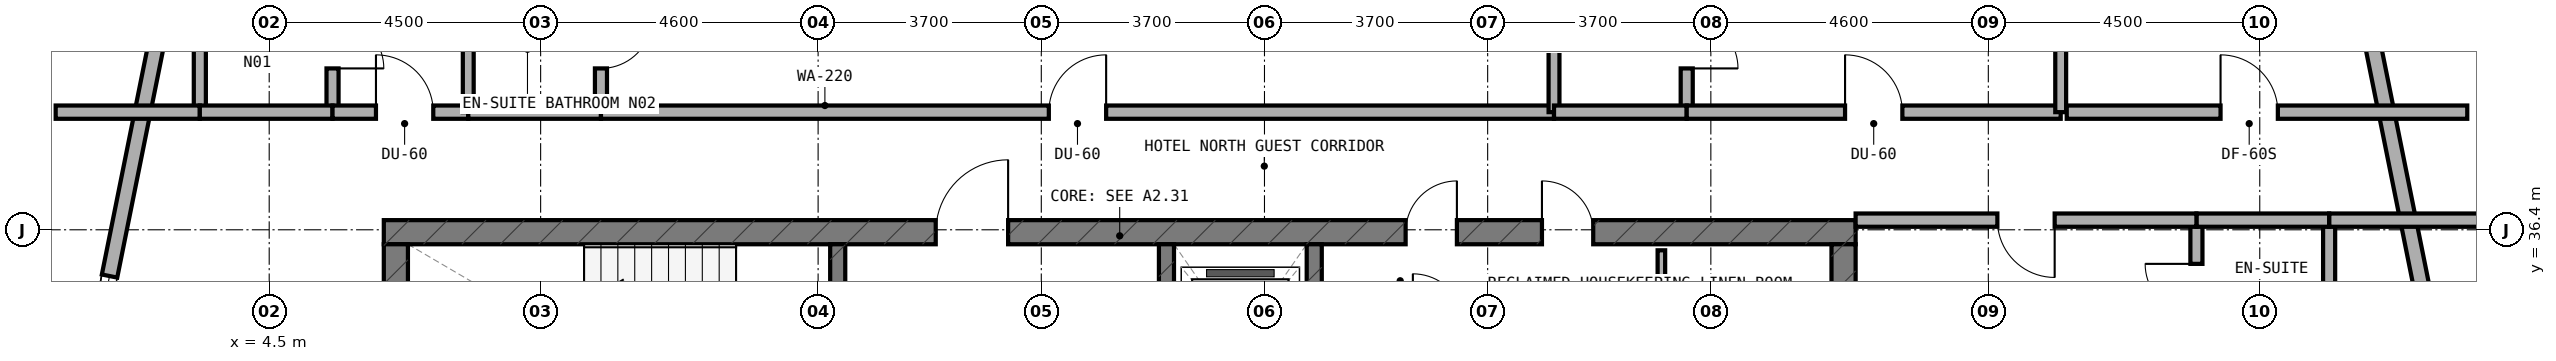
"""IFC4 building model, lengths in metres.
Left out: names, types, materials, properties, quantities, classifications, styles, units other than length and angle.
Written with IfcOpenShell. Run it as: python <this file> out.ifc"""

import sys

from ifc_helpers import new_model, si_unit, direction, frame, frame_2d, origin, place, context, subcontext, project, spatial, rectangle, extrude, element, fill, save


model = new_model("IFC4")
c1 = context("Model", 3, precision=1e-05, world=origin(), true_north=direction((0.0, 1.0)))
c2 = subcontext(c1, "Body", "Model", "MODEL_VIEW")
j1 = project(units=[si_unit("LENGTHUNIT", "METRE"), si_unit("PLANEANGLEUNIT", "RADIAN")], contexts=[c1])
p1 = place(None, origin())
s1 = spatial("IfcSite", under=j1, at=p1, CompositionType="ELEMENT")
p2 = place(p1, origin())
s2 = spatial("IfcBuilding", under=s1, at=p2, CompositionType="ELEMENT")
p3 = place(p2, frame((0.0, 0.0, 134.5)))
s3 = spatial("IfcBuildingStorey", under=s2, at=p3, CompositionType="ELEMENT", Elevation=134.5)
p4 = place(p3, frame((6.4, 36.36, 0.0), z_axis=(0.0, 0.0, 1.0), x_axis=(1.0, 0.0, 0.0)))
e1 = element("IfcWall", 1, at=p4, inside=s3, PredefinedType="SHEAR", context=c2, shape_type="SweptSolid", body=[
    extrude(rectangle(XDim=24.4, YDim=0.4, at=frame_2d((12.2, 0.0))), origin(), (0.0, 0.0, 1.0), 3.5),
])
p5 = place(p4, frame((9.15, 0.0, 0.0)))
e2 = element("IfcOpeningElement", 2, at=p5, cuts=e1, PredefinedType="OPENING", context=c2, shape_type="SweptSolid", body=[
    extrude(rectangle(XDim=1.2, YDim=2.15, at=frame_2d((0.6, 1.075))), frame((0.0, 0.21, 0.0), z_axis=(0.0, -1.0, 0.0), x_axis=(1.0, 0.0, 0.0)), (0.0, 0.0, 1.0), 0.42),
])
p6 = place(p4, frame((19.2, 0.0, 0.0)))
e3 = element("IfcOpeningElement", 3, at=p6, cuts=e1, PredefinedType="OPENING", context=c2, shape_type="SweptSolid", body=[
    extrude(rectangle(XDim=0.85, YDim=2.1, at=frame_2d((0.425, 1.05))), frame((0.0, 0.21, 0.0), z_axis=(0.0, -1.0, 0.0), x_axis=(1.0, 0.0, 0.0)), (0.0, 0.0, 1.0), 0.42),
])
p7 = place(p4, frame((16.94, 0.0, 0.0)))
e4 = element("IfcOpeningElement", 4, at=p7, cuts=e1, PredefinedType="OPENING", context=c2, shape_type="SweptSolid", body=[
    extrude(rectangle(XDim=0.85, YDim=2.1, at=frame_2d((0.425, 1.05))), frame((0.0, 0.21, 0.0), z_axis=(0.0, -1.0, 0.0), x_axis=(1.0, 0.0, 0.0)), (0.0, 0.0, 1.0), 0.42),
])
for number, where, z_axis, x_axis in (
    (5, (6.6, 33.0, 0.0), (0.0, 0.0, 1.0), (0.0, 1.0, 0.0)),
    (6, (30.6, 33.0, 0.0), (0.0, 0.0, 1.0), (0.0, 1.0, 0.0)),
):
    element("IfcWall", number, at=place(p3, frame(where, z_axis=z_axis, x_axis=x_axis)), inside=s3, PredefinedType="SHEAR", context=c2, shape_type="SweptSolid", body=[
        extrude(rectangle(XDim=3.16, YDim=0.4, at=frame_2d((1.58, 0.0))), origin(), (0.0, 0.0, 1.0), 3.5),
    ])
p8 = place(p3, frame((13.925, 33.0, 0.0), z_axis=(0.0, 0.0, 1.0), x_axis=(0.0, 1.0, 0.0)))
e7 = element("IfcWall", 7, at=p8, inside=s3, PredefinedType="STANDARD", context=c2, shape_type="SweptSolid", body=[
    extrude(rectangle(XDim=3.16, YDim=0.25, at=frame_2d((1.58, 0.0))), origin(), (0.0, 0.0, 1.0), 3.22),
])
p9 = place(p8, frame((0.98, 0.0, 0.0)))
e8 = element("IfcOpeningElement", 8, at=p9, cuts=e7, PredefinedType="OPENING", context=c2, shape_type="SweptSolid", body=[
    extrude(rectangle(XDim=1.1, YDim=2.15, at=frame_2d((0.55, 1.075))), frame((0.0, 0.135, 0.0), z_axis=(0.0, -1.0, 0.0), x_axis=(1.0, 0.0, 0.0)), (0.0, 0.0, 1.0), 0.27),
])
p10 = place(p3, frame((19.375, 33.0, 0.0), z_axis=(0.0, 0.0, 1.0), x_axis=(0.0, 1.0, 0.0)))
e9 = element("IfcWall", 9, at=p10, inside=s3, PredefinedType="STANDARD", context=c2, shape_type="SweptSolid", body=[
    extrude(rectangle(XDim=3.16, YDim=0.25, at=frame_2d((1.58, 0.0))), origin(), (0.0, 0.0, 1.0), 3.22),
])
p11 = place(p10, frame((0.98, 0.0, 0.0)))
e10 = element("IfcOpeningElement", 10, at=p11, cuts=e9, PredefinedType="OPENING", context=c2, shape_type="SweptSolid", body=[
    extrude(rectangle(XDim=1.1, YDim=2.15, at=frame_2d((0.55, 1.075))), frame((0.0, 0.135, 0.0), z_axis=(0.0, -1.0, 0.0), x_axis=(1.0, 0.0, 0.0)), (0.0, 0.0, 1.0), 0.27),
])
p12 = place(p3, frame((21.825, 33.0, 0.0), z_axis=(0.0, 0.0, 1.0), x_axis=(0.0, 1.0, 0.0)))
e11 = element("IfcWall", 11, at=p12, inside=s3, PredefinedType="STANDARD", context=c2, shape_type="SweptSolid", body=[
    extrude(rectangle(XDim=3.16, YDim=0.25, at=frame_2d((1.58, 0.0))), origin(), (0.0, 0.0, 1.0), 3.22),
])
p13 = place(p3, frame((41.084, 30.98, 0.0), z_axis=(0.0, 0.0, 1.0), x_axis=(-0.197435082048, 0.980315963543, 0.0)))
e12 = element("IfcWall", 12, at=p13, inside=s3, PredefinedType="STANDARD", context=c2, shape_type="SweptSolid", body=[
    extrude(rectangle(XDim=9.183, YDim=0.26, at=frame_2d((4.591, 0.0))), origin(), (0.0, 0.0, 1.0), 3.22),
])
p14 = place(p13, frame((1.734, 0.0, 0.85)))
e13 = element("IfcOpeningElement", 13, at=p14, cuts=e12, PredefinedType="OPENING", context=c2, shape_type="SweptSolid", body=[
    extrude(rectangle(XDim=2.1, YDim=1.5, at=frame_2d((1.05, 0.75))), frame((0.0, 0.14, 0.0), z_axis=(0.0, -1.0, 0.0), x_axis=(1.0, 0.0, 0.0)), (0.0, 0.0, 1.0), 0.28),
])
p15 = place(p3, frame((2.729, 39.982, 0.0), z_axis=(0.0, 0.0, 1.0), x_axis=(-0.197435082048, -0.980315963543, 0.0)))
e14 = element("IfcWall", 14, at=p15, inside=s3, PredefinedType="STANDARD", context=c2, shape_type="SweptSolid", body=[
    extrude(rectangle(XDim=9.183, YDim=0.26, at=frame_2d((4.591, 0.0))), origin(), (0.0, 0.0, 1.0), 3.22),
])
p16 = place(p15, frame((4.436, 0.0, 0.85)))
e15 = element("IfcOpeningElement", 15, at=p16, cuts=e14, PredefinedType="OPENING", context=c2, shape_type="SweptSolid", body=[
    extrude(rectangle(XDim=2.1, YDim=1.5, at=frame_2d((1.05, 0.75))), frame((0.0, 0.14, 0.0), z_axis=(0.0, -1.0, 0.0), x_axis=(1.0, 0.0, 0.0)), (0.0, 0.0, 1.0), 0.28),
])
p17 = place(p3, frame((27.58, 33.1, 0.0), z_axis=(0.0, 0.0, 1.0), x_axis=(0.0, 1.0, 0.0)))
e16 = element("IfcWall", 16, at=p17, inside=s3, PredefinedType="PARTITIONING", context=c2, shape_type="SweptSolid", body=[
    extrude(rectangle(XDim=2.96, YDim=0.125, at=frame_2d((1.48, 0.0))), origin(), (0.0, 0.0, 1.0), 2.695),
])
p18 = place(p17, frame((1.055, 0.0, 0.0)))
e17 = element("IfcOpeningElement", 17, at=p18, cuts=e16, PredefinedType="OPENING", context=c2, shape_type="SweptSolid", body=[
    extrude(rectangle(XDim=0.85, YDim=2.1, at=frame_2d((0.425, 1.05))), frame((0.0, 0.073, 0.0), z_axis=(0.0, -1.0, 0.0), x_axis=(1.0, 0.0, 0.0)), (0.0, 0.0, 1.0), 0.145),
])
p19 = place(p3, frame((5.55, 38.45, 0.0), z_axis=(0.0, 0.0, 1.0), x_axis=(0.0, 1.0, 0.0)))
e18 = element("IfcWall", 18, at=p19, inside=s3, PredefinedType="PLUMBINGWALL", context=c2, shape_type="SweptSolid", body=[
    extrude(rectangle(XDim=2.1, YDim=0.2, at=frame_2d((1.05, 0.0))), origin(), (0.0, 0.0, 1.0), 3.22),
])
p20 = place(p19, frame((0.625, 0.0, 0.0)))
e19 = element("IfcOpeningElement", 19, at=p20, cuts=e18, PredefinedType="OPENING", context=c2, shape_type="SweptSolid", body=[
    extrude(rectangle(XDim=0.85, YDim=2.1, at=frame_2d((0.425, 1.05))), frame((0.0, 0.11, 0.0), z_axis=(0.0, -1.0, 0.0), x_axis=(1.0, 0.0, 0.0)), (0.0, 0.0, 1.0), 0.22),
])
p21 = place(p3, frame((3.35, 38.45, 0.0), z_axis=(0.0, 0.0, 1.0), x_axis=(0.0, 1.0, 0.0)))
e20 = element("IfcWall", 20, at=p21, inside=s3, PredefinedType="PLUMBINGWALL", context=c2, shape_type="SweptSolid", body=[
    extrude(rectangle(XDim=2.1, YDim=0.2, at=frame_2d((1.05, 0.0))), origin(), (0.0, 0.0, 1.0), 3.22),
])
p22 = place(p3, frame((0.96, 38.35, 0.0), z_axis=(0.0, 0.0, 1.0), x_axis=(1.0, 0.0, 0.0)))
e21 = element("IfcWall", 21, at=p22, inside=s3, PredefinedType="SOLIDWALL", context=c2, shape_type="SweptSolid", body=[
    extrude(rectangle(XDim=2.39, YDim=0.22, at=frame_2d((1.195, 0.0))), origin(), (0.0, 0.0, 1.0), 3.22),
])
p23 = place(p3, frame((3.35, 38.35, 0.0), z_axis=(0.0, 0.0, 1.0), x_axis=(1.0, 0.0, 0.0)))
e22 = element("IfcWall", 22, at=p23, inside=s3, PredefinedType="SOLIDWALL", context=c2, shape_type="SweptSolid", body=[
    extrude(rectangle(XDim=2.2, YDim=0.22, at=frame_2d((1.1, 0.0))), origin(), (0.0, 0.0, 1.0), 3.22),
])
p24 = place(p3, frame((5.55, 38.35, 0.0), z_axis=(0.0, 0.0, 1.0), x_axis=(1.0, 0.0, 0.0)))
e23 = element("IfcWall", 23, at=p24, inside=s3, PredefinedType="SOLIDWALL", context=c2, shape_type="SweptSolid", body=[
    extrude(rectangle(XDim=2.25, YDim=0.22, at=frame_2d((1.125, 0.0))), origin(), (0.0, 0.0, 1.0), 2.695),
])
p25 = place(p24, frame((0.72, 0.0, 0.0)))
e24 = element("IfcOpeningElement", 24, at=p25, cuts=e23, PredefinedType="OPENING", context=c2, shape_type="SweptSolid", body=[
    extrude(rectangle(XDim=0.95, YDim=2.1, at=frame_2d((0.475, 1.05))), frame((0.0, 0.12, 0.0), z_axis=(0.0, -1.0, 0.0), x_axis=(1.0, 0.0, 0.0)), (0.0, 0.0, 1.0), 0.24),
])
p26 = place(p3, frame((7.8, 38.35, 0.0), z_axis=(0.0, 0.0, 1.0), x_axis=(0.0, 1.0, 0.0)))
e25 = element("IfcWall", 25, at=p26, inside=s3, PredefinedType="SOLIDWALL", context=c2, shape_type="SweptSolid", body=[
    extrude(rectangle(XDim=5.351, YDim=0.18, at=frame_2d((2.675, 0.0))), origin(), (0.0, 0.0, 1.0), 2.695),
])
p27 = place(p3, frame((10.0, 38.45, 0.0), z_axis=(0.0, 0.0, 1.0), x_axis=(0.0, 1.0, 0.0)))
e26 = element("IfcWall", 26, at=p27, inside=s3, PredefinedType="PLUMBINGWALL", context=c2, shape_type="SweptSolid", body=[
    extrude(rectangle(XDim=2.1, YDim=0.2, at=frame_2d((1.05, 0.0))), origin(), (0.0, 0.0, 1.0), 2.835),
])
p28 = place(p27, frame((0.625, 0.0, 0.0)))
e27 = element("IfcOpeningElement", 27, at=p28, cuts=e26, PredefinedType="OPENING", context=c2, shape_type="SweptSolid", body=[
    extrude(rectangle(XDim=0.85, YDim=2.1, at=frame_2d((0.425, 1.05))), frame((0.0, 0.11, 0.0), z_axis=(0.0, -1.0, 0.0), x_axis=(1.0, 0.0, 0.0)), (0.0, 0.0, 1.0), 0.22),
])
p29 = place(p3, frame((7.8, 38.35, 0.0), z_axis=(0.0, 0.0, 1.0), x_axis=(1.0, 0.0, 0.0)))
e28 = element("IfcWall", 28, at=p29, inside=s3, PredefinedType="SOLIDWALL", context=c2, shape_type="SweptSolid", body=[
    extrude(rectangle(XDim=2.2, YDim=0.22, at=frame_2d((1.1, 0.0))), origin(), (0.0, 0.0, 1.0), 2.695),
])
p30 = place(p3, frame((10.0, 38.35, 0.0), z_axis=(0.0, 0.0, 1.0), x_axis=(1.0, 0.0, 0.0)))
e29 = element("IfcWall", 29, at=p30, inside=s3, PredefinedType="SOLIDWALL", context=c2, shape_type="SweptSolid", body=[
    extrude(rectangle(XDim=15.8, YDim=0.22, at=frame_2d((7.9, 0.0))), origin(), (0.0, 0.0, 1.0), 2.695),
])
p31 = place(p30, frame((7.425, 0.0, 0.0)))
e30 = element("IfcOpeningElement", 30, at=p31, cuts=e29, PredefinedType="OPENING", context=c2, shape_type="SweptSolid", body=[
    extrude(rectangle(XDim=0.95, YDim=2.1, at=frame_2d((0.475, 1.05))), frame((0.0, 0.12, 0.0), z_axis=(0.0, -1.0, 0.0), x_axis=(1.0, 0.0, 0.0)), (0.0, 0.0, 1.0), 0.24),
])
p32 = place(p3, frame((25.8, 38.35, 0.0), z_axis=(0.0, 0.0, 1.0), x_axis=(0.0, 1.0, 0.0)))
e31 = element("IfcWall", 31, at=p32, inside=s3, PredefinedType="SOLIDWALL", context=c2, shape_type="SweptSolid", body=[
    extrude(rectangle(XDim=6.79, YDim=0.18, at=frame_2d((3.395, 0.0))), origin(), (0.0, 0.0, 1.0), 2.695),
])
p33 = place(p3, frame((28.0, 38.45, 0.0), z_axis=(0.0, 0.0, 1.0), x_axis=(0.0, 1.0, 0.0)))
e32 = element("IfcWall", 32, at=p33, inside=s3, PredefinedType="PLUMBINGWALL", context=c2, shape_type="SweptSolid", body=[
    extrude(rectangle(XDim=2.1, YDim=0.2, at=frame_2d((1.05, 0.0))), origin(), (0.0, 0.0, 1.0), 2.835),
])
p34 = place(p33, frame((0.625, 0.0, 0.0)))
e33 = element("IfcOpeningElement", 33, at=p34, cuts=e32, PredefinedType="OPENING", context=c2, shape_type="SweptSolid", body=[
    extrude(rectangle(XDim=0.85, YDim=2.1, at=frame_2d((0.425, 1.05))), frame((0.0, 0.11, 0.0), z_axis=(0.0, -1.0, 0.0), x_axis=(1.0, 0.0, 0.0)), (0.0, 0.0, 1.0), 0.22),
])
p35 = place(p3, frame((25.8, 38.35, 0.0), z_axis=(0.0, 0.0, 1.0), x_axis=(1.0, 0.0, 0.0)))
e34 = element("IfcWall", 34, at=p35, inside=s3, PredefinedType="SOLIDWALL", context=c2, shape_type="SweptSolid", body=[
    extrude(rectangle(XDim=2.2, YDim=0.22, at=frame_2d((1.1, 0.0))), origin(), (0.0, 0.0, 1.0), 2.695),
])
p36 = place(p3, frame((28.0, 38.35, 0.0), z_axis=(0.0, 0.0, 1.0), x_axis=(1.0, 0.0, 0.0)))
e35 = element("IfcWall", 35, at=p36, inside=s3, PredefinedType="SOLIDWALL", context=c2, shape_type="SweptSolid", body=[
    extrude(rectangle(XDim=6.2, YDim=0.22, at=frame_2d((3.1, 0.0))), origin(), (0.0, 0.0, 1.0), 2.695),
])
p37 = place(p36, frame((2.625, 0.0, 0.0)))
e36 = element("IfcOpeningElement", 36, at=p37, cuts=e35, PredefinedType="OPENING", context=c2, shape_type="SweptSolid", body=[
    extrude(rectangle(XDim=0.95, YDim=2.1, at=frame_2d((0.475, 1.05))), frame((0.0, 0.12, 0.0), z_axis=(0.0, -1.0, 0.0), x_axis=(1.0, 0.0, 0.0)), (0.0, 0.0, 1.0), 0.24),
])
p38 = place(p3, frame((34.2, 38.35, 0.0), z_axis=(0.0, 0.0, 1.0), x_axis=(0.0, 1.0, 0.0)))
e37 = element("IfcWall", 37, at=p38, inside=s3, PredefinedType="SOLIDWALL", context=c2, shape_type="SweptSolid", body=[
    extrude(rectangle(XDim=5.351, YDim=0.18, at=frame_2d((2.675, 0.0))), origin(), (0.0, 0.0, 1.0), 2.695),
])
p39 = place(p3, frame((34.3, 38.35, 0.0), z_axis=(0.0, 0.0, 1.0), x_axis=(1.0, 0.0, 0.0)))
e38 = element("IfcWall", 38, at=p39, inside=s3, PredefinedType="SOLIDWALL", context=c2, shape_type="SweptSolid", body=[
    extrude(rectangle(XDim=6.64, YDim=0.22, at=frame_2d((3.32, 0.0))), origin(), (0.0, 0.0, 1.0), 2.835),
])
p40 = place(p39, frame((2.55, 0.0, 0.0)))
e39 = element("IfcOpeningElement", 39, at=p40, cuts=e38, PredefinedType="OPENING", context=c2, shape_type="SweptSolid", body=[
    extrude(rectangle(XDim=0.95, YDim=2.1, at=frame_2d((0.475, 1.05))), frame((0.0, 0.12, 0.0), z_axis=(0.0, -1.0, 0.0), x_axis=(1.0, 0.0, 0.0)), (0.0, 0.0, 1.0), 0.24),
])
p41 = place(p3, frame((36.45, 34.36, 0.0), z_axis=(0.0, 0.0, 1.0), x_axis=(0.0, 1.0, 0.0)))
e40 = element("IfcWall", 40, at=p41, inside=s3, PredefinedType="PLUMBINGWALL", context=c2, shape_type="SweptSolid", body=[
    extrude(rectangle(XDim=2.1, YDim=0.2, at=frame_2d((1.05, 0.0))), origin(), (0.0, 0.0, 1.0), 3.22),
])
p42 = place(p41, frame((0.625, 0.0, 0.0)))
e41 = element("IfcOpeningElement", 41, at=p42, cuts=e40, PredefinedType="OPENING", context=c2, shape_type="SweptSolid", body=[
    extrude(rectangle(XDim=0.85, YDim=2.1, at=frame_2d((0.425, 1.05))), frame((0.0, 0.11, 0.0), z_axis=(0.0, -1.0, 0.0), x_axis=(1.0, 0.0, 0.0)), (0.0, 0.0, 1.0), 0.22),
])
p43 = place(p3, frame((38.65, 34.36, 0.0), z_axis=(0.0, 0.0, 1.0), x_axis=(0.0, 1.0, 0.0)))
e42 = element("IfcWall", 42, at=p43, inside=s3, PredefinedType="PLUMBINGWALL", context=c2, shape_type="SweptSolid", body=[
    extrude(rectangle(XDim=2.1, YDim=0.2, at=frame_2d((1.05, 0.0))), origin(), (0.0, 0.0, 1.0), 3.22),
])
p44 = place(p3, frame((38.65, 36.56, 0.0), z_axis=(0.0, 0.0, 1.0), x_axis=(1.0, 0.0, 0.0)))
e43 = element("IfcWall", 43, at=p44, inside=s3, PredefinedType="SOLIDWALL", context=c2, shape_type="SweptSolid", body=[
    extrude(rectangle(XDim=2.55, YDim=0.22, at=frame_2d((1.275, 0.0))), origin(), (0.0, 0.0, 1.0), 3.22),
])
p45 = place(p3, frame((36.45, 36.56, 0.0), z_axis=(0.0, 0.0, 1.0), x_axis=(1.0, 0.0, 0.0)))
e44 = element("IfcWall", 44, at=p45, inside=s3, PredefinedType="SOLIDWALL", context=c2, shape_type="SweptSolid", body=[
    extrude(rectangle(XDim=2.2, YDim=0.22, at=frame_2d((1.1, 0.0))), origin(), (0.0, 0.0, 1.0), 3.22),
])
p46 = place(p3, frame((30.8, 36.56, 0.0), z_axis=(0.0, 0.0, 1.0), x_axis=(1.0, 0.0, 0.0)))
e45 = element("IfcWall", 45, at=p46, inside=s3, PredefinedType="SOLIDWALL", context=c2, shape_type="SweptSolid", body=[
    extrude(rectangle(XDim=5.65, YDim=0.22, at=frame_2d((2.825, 0.0))), origin(), (0.0, 0.0, 1.0), 2.695),
])
p47 = place(p46, frame((2.35, 0.0, 0.0)))
e46 = element("IfcOpeningElement", 46, at=p47, cuts=e45, PredefinedType="OPENING", context=c2, shape_type="SweptSolid", body=[
    extrude(rectangle(XDim=0.95, YDim=2.1, at=frame_2d((0.475, 1.05))), frame((0.0, 0.12, 0.0), z_axis=(0.0, -1.0, 0.0), x_axis=(1.0, 0.0, 0.0)), (0.0, 0.0, 1.0), 0.24),
])
p48 = place(p16, origin())
e47 = element("IfcWindow", 47, at=p48, inside=s3, PartitioningType="SINGLE_PANEL", PredefinedType="WINDOW", context=c2, shape_type="SweptSolid", body=[
    extrude(rectangle(XDim=2.1, YDim=1.5, at=frame_2d((1.05, 0.75))), frame((0.0, 0.03, 0.0), z_axis=(0.0, -1.0, 0.0), x_axis=(1.0, 0.0, 0.0)), (0.0, 0.0, 1.0), 0.06),
])
fill(e15, e47)
p49 = place(p5, origin())
e48 = element("IfcDoor", 48, at=p49, inside=s3, OperationType="SINGLE_SWING_RIGHT", PredefinedType="DOOR", context=c2, shape_type="SweptSolid", body=[
    extrude(rectangle(XDim=1.2, YDim=2.15, at=frame_2d((0.6, 1.075))), frame((0.0, 0.025, 0.0), z_axis=(0.0, -1.0, 0.0), x_axis=(1.0, 0.0, 0.0)), (0.0, 0.0, 1.0), 0.05),
])
fill(e2, e48)
p50 = place(p6, origin())
e49 = element("IfcDoor", 49, at=p50, inside=s3, OperationType="SINGLE_SWING_LEFT", PredefinedType="DOOR", context=c2, shape_type="SweptSolid", body=[
    extrude(rectangle(XDim=0.85, YDim=2.1, at=frame_2d((0.425, 1.05))), frame((0.0, 0.025, 0.0), z_axis=(0.0, -1.0, 0.0), x_axis=(1.0, 0.0, 0.0)), (0.0, 0.0, 1.0), 0.05),
])
fill(e3, e49)
p51 = place(p7, origin())
e50 = element("IfcDoor", 50, at=p51, inside=s3, OperationType="SINGLE_SWING_RIGHT", PredefinedType="DOOR", context=c2, shape_type="SweptSolid", body=[
    extrude(rectangle(XDim=0.85, YDim=2.1, at=frame_2d((0.425, 1.05))), frame((0.0, 0.025, 0.0), z_axis=(0.0, -1.0, 0.0), x_axis=(1.0, 0.0, 0.0)), (0.0, 0.0, 1.0), 0.05),
])
fill(e4, e50)
p52 = place(p20, frame((0.85, 0.0, 0.0), z_axis=(0.0, 0.0, 1.0), x_axis=(-1.0, 0.0, 0.0)))
e51 = element("IfcDoor", 51, at=p52, inside=s3, OperationType="SINGLE_SWING_RIGHT", PredefinedType="DOOR", context=c2, shape_type="SweptSolid", body=[
    extrude(rectangle(XDim=0.85, YDim=2.1, at=frame_2d((0.425, 1.05))), frame((0.0, 0.025, 0.0), z_axis=(0.0, -1.0, 0.0), x_axis=(1.0, 0.0, 0.0)), (0.0, 0.0, 1.0), 0.05),
])
fill(e19, e51)
p53 = place(p25, origin())
e52 = element("IfcDoor", 52, at=p53, inside=s3, OperationType="SINGLE_SWING_LEFT", PredefinedType="DOOR", context=c2, shape_type="SweptSolid", body=[
    extrude(rectangle(XDim=0.95, YDim=2.1, at=frame_2d((0.475, 1.05))), frame((0.0, 0.025, 0.0), z_axis=(0.0, -1.0, 0.0), x_axis=(1.0, 0.0, 0.0)), (0.0, 0.0, 1.0), 0.05),
])
fill(e24, e52)
p54 = place(p28, frame((0.85, 0.0, 0.0), z_axis=(0.0, 0.0, 1.0), x_axis=(-1.0, 0.0, 0.0)))
e53 = element("IfcDoor", 53, at=p54, inside=s3, OperationType="SINGLE_SWING_LEFT", PredefinedType="DOOR", context=c2, shape_type="SweptSolid", body=[
    extrude(rectangle(XDim=0.85, YDim=2.1, at=frame_2d((0.425, 1.05))), frame((0.0, 0.025, 0.0), z_axis=(0.0, -1.0, 0.0), x_axis=(1.0, 0.0, 0.0)), (0.0, 0.0, 1.0), 0.05),
])
fill(e27, e53)
p55 = place(p31, origin())
e54 = element("IfcDoor", 54, at=p55, inside=s3, OperationType="SINGLE_SWING_RIGHT", PredefinedType="DOOR", context=c2, shape_type="SweptSolid", body=[
    extrude(rectangle(XDim=0.95, YDim=2.1, at=frame_2d((0.475, 1.05))), frame((0.0, 0.025, 0.0), z_axis=(0.0, -1.0, 0.0), x_axis=(1.0, 0.0, 0.0)), (0.0, 0.0, 1.0), 0.05),
])
fill(e30, e54)
p56 = place(p34, frame((0.85, 0.0, 0.0), z_axis=(0.0, 0.0, 1.0), x_axis=(-1.0, 0.0, 0.0)))
e55 = element("IfcDoor", 55, at=p56, inside=s3, OperationType="SINGLE_SWING_RIGHT", PredefinedType="DOOR", context=c2, shape_type="SweptSolid", body=[
    extrude(rectangle(XDim=0.85, YDim=2.1, at=frame_2d((0.425, 1.05))), frame((0.0, 0.025, 0.0), z_axis=(0.0, -1.0, 0.0), x_axis=(1.0, 0.0, 0.0)), (0.0, 0.0, 1.0), 0.05),
])
fill(e33, e55)
p57 = place(p37, origin())
e56 = element("IfcDoor", 56, at=p57, inside=s3, OperationType="SINGLE_SWING_LEFT", PredefinedType="DOOR", context=c2, shape_type="SweptSolid", body=[
    extrude(rectangle(XDim=0.95, YDim=2.1, at=frame_2d((0.475, 1.05))), frame((0.0, 0.025, 0.0), z_axis=(0.0, -1.0, 0.0), x_axis=(1.0, 0.0, 0.0)), (0.0, 0.0, 1.0), 0.05),
])
fill(e36, e56)
p58 = place(p40, origin())
e57 = element("IfcDoor", 57, at=p58, inside=s3, OperationType="SINGLE_SWING_LEFT", PredefinedType="DOOR", context=c2, shape_type="SweptSolid", body=[
    extrude(rectangle(XDim=0.95, YDim=2.1, at=frame_2d((0.475, 1.05))), frame((0.0, 0.025, 0.0), z_axis=(0.0, -1.0, 0.0), x_axis=(1.0, 0.0, 0.0)), (0.0, 0.0, 1.0), 0.05),
])
fill(e39, e57)
p59 = place(p42, origin())
e58 = element("IfcDoor", 58, at=p59, inside=s3, OperationType="SINGLE_SWING_RIGHT", PredefinedType="DOOR", context=c2, shape_type="SweptSolid", body=[
    extrude(rectangle(XDim=0.85, YDim=2.1, at=frame_2d((0.425, 1.05))), frame((0.0, 0.025, 0.0), z_axis=(0.0, -1.0, 0.0), x_axis=(1.0, 0.0, 0.0)), (0.0, 0.0, 1.0), 0.05),
])
fill(e41, e58)
p60 = place(p47, frame((0.95, 0.0, 0.0), z_axis=(0.0, 0.0, 1.0), x_axis=(-1.0, 0.0, 0.0)))
e59 = element("IfcDoor", 59, at=p60, inside=s3, OperationType="SINGLE_SWING_LEFT", PredefinedType="DOOR", context=c2, shape_type="SweptSolid", body=[
    extrude(rectangle(XDim=0.95, YDim=2.1, at=frame_2d((0.475, 1.05))), frame((0.0, 0.025, 0.0), z_axis=(0.0, -1.0, 0.0), x_axis=(1.0, 0.0, 0.0)), (0.0, 0.0, 1.0), 0.05),
])
fill(e46, e59)
save(model, sys.argv[1])
